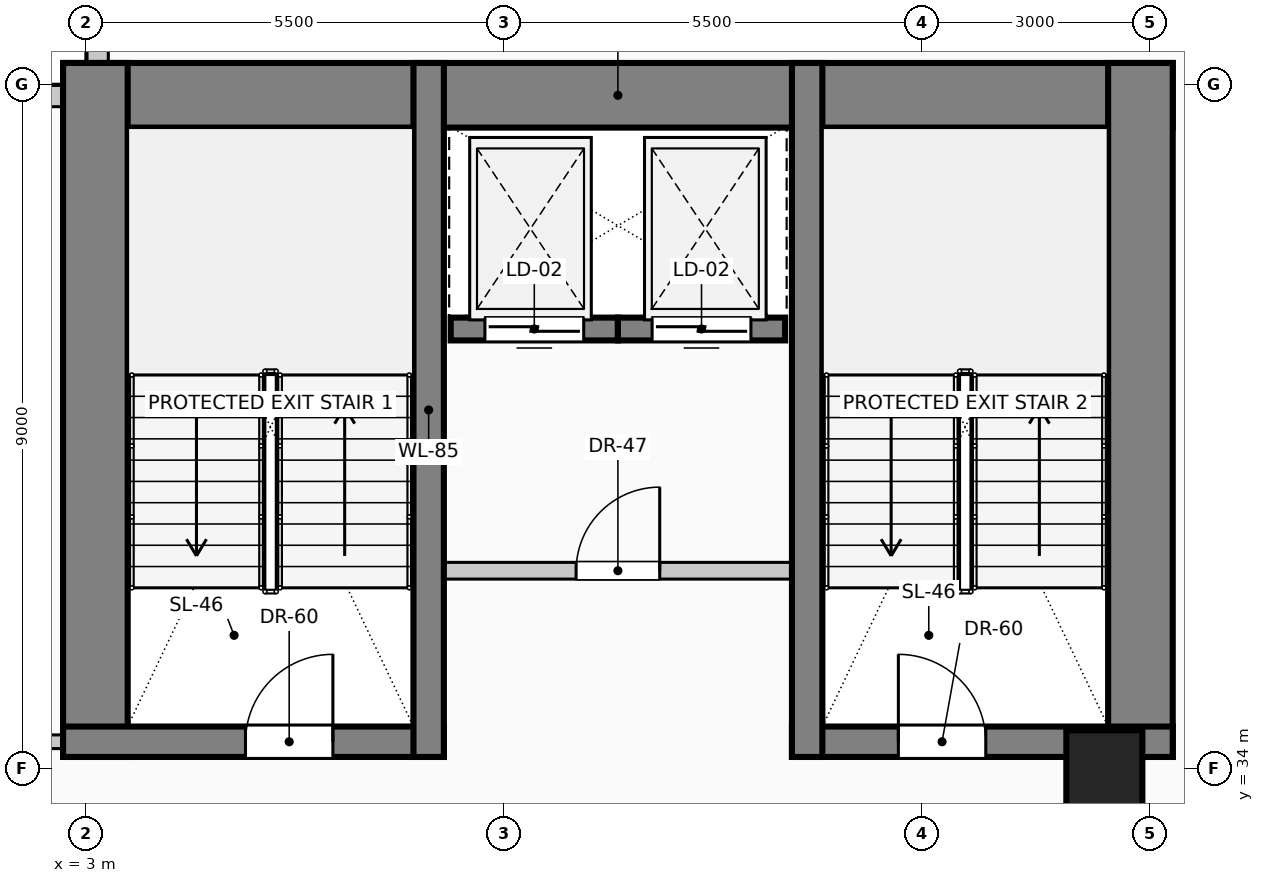
"""IFC4 building model, lengths in metres.
Left out: names, types, materials, properties, quantities, classifications, styles, units other than length and angle.
Written with IfcOpenShell. Run it as: python <this file> out.ifc"""

import sys

from ifc_helpers import new_model, si_unit, direction, frame, frame_2d, origin, origin_2d, place, context, subcontext, project, spatial, rectangle, circle, extrude, element, fill, save


model = new_model("IFC4")
c1 = context("Model", 3, precision=1e-05, world=origin(), true_north=direction((0.0, 1.0)))
c2 = subcontext(c1, "Body", "Model", "MODEL_VIEW")
j1 = project(units=[si_unit("LENGTHUNIT", "METRE"), si_unit("PLANEANGLEUNIT", "RADIAN")], contexts=[c1])
p1 = place(None, origin())
s1 = spatial("IfcSite", under=j1, at=p1, CompositionType="ELEMENT")
p2 = place(p1, origin())
s2 = spatial("IfcBuilding", under=s1, at=p2, CompositionType="ELEMENT")
p3 = place(p2, frame((0.0, 0.0, 104.6)))
s3 = spatial("IfcBuildingStorey", under=s2, at=p3, CompositionType="ELEMENT", Elevation=104.6)
p4 = place(p3, frame((2.7, 42.855, 0.0), z_axis=(0.0, 0.0, 1.0), x_axis=(1.0, 0.0, 0.0)))
e1 = element("IfcWall", 1, at=p4, inside=s3, PredefinedType="SHEAR", context=c2, shape_type="SweptSolid", body=[
    extrude(rectangle(XDim=14.6, YDim=0.85, at=frame_2d((7.3, 0.0))), origin(), (0.0, 0.0, 1.0), 4.0),
])
for number, where, z_axis, x_axis in (
    (2, (3.125, 34.15, 0.0), (0.0, 0.0, 1.0), (0.0, 1.0, 0.0)),
    (3, (16.875, 34.15, 0.0), (0.0, 0.0, 1.0), (0.0, 1.0, 0.0)),
):
    element("IfcWall", number, at=place(p3, frame(where, z_axis=z_axis, x_axis=x_axis)), inside=s3, PredefinedType="SHEAR", context=c2, shape_type="SweptSolid", body=[
        extrude(rectangle(XDim=9.13, YDim=0.85, at=frame_2d((4.565, 0.0))), origin(), (0.0, 0.0, 1.0), 4.0),
    ])
p5 = place(p3, frame((2.7, 34.35, 0.0), z_axis=(0.0, 0.0, 1.0), x_axis=(1.0, 0.0, 0.0)))
e4 = element("IfcWall", 4, at=p5, inside=s3, PredefinedType="SHEAR", context=c2, shape_type="SweptSolid", body=[
    extrude(rectangle(XDim=5.01, YDim=0.4, at=frame_2d((2.505, 0.0))), origin(), (0.0, 0.0, 1.0), 4.0),
])
p6 = place(p5, frame((2.4, 0.0, 0.0)))
e5 = element("IfcOpeningElement", 5, at=p6, cuts=e4, PredefinedType="OPENING", context=c2, shape_type="SweptSolid", body=[
    extrude(rectangle(XDim=1.15, YDim=2.2, at=frame_2d((0.575, 1.1))), frame((0.0, 0.21, 0.0), z_axis=(0.0, -1.0, 0.0), x_axis=(1.0, 0.0, 0.0)), (0.0, 0.0, 1.0), 0.42),
])
p7 = place(p3, frame((12.29, 34.35, 0.0), z_axis=(0.0, 0.0, 1.0), x_axis=(1.0, 0.0, 0.0)))
e6 = element("IfcWall", 6, at=p7, inside=s3, PredefinedType="SHEAR", context=c2, shape_type="SweptSolid", body=[
    extrude(rectangle(XDim=5.01, YDim=0.4, at=frame_2d((2.505, 0.0))), origin(), (0.0, 0.0, 1.0), 4.0),
])
p8 = place(p7, frame((1.4, 0.0, 0.0)))
e7 = element("IfcOpeningElement", 7, at=p8, cuts=e6, PredefinedType="OPENING", context=c2, shape_type="SweptSolid", body=[
    extrude(rectangle(XDim=1.15, YDim=2.2, at=frame_2d((0.575, 1.1))), frame((0.0, 0.21, 0.0), z_axis=(0.0, -1.0, 0.0), x_axis=(1.0, 0.0, 0.0)), (0.0, 0.0, 1.0), 0.42),
])
for number, where, z_axis, x_axis in (
    (8, (7.51, 34.15, 0.0), (0.0, 0.0, 1.0), (0.0, 1.0, 0.0)),
    (9, (12.49, 34.15, 0.0), (0.0, 0.0, 1.0), (0.0, 1.0, 0.0)),
):
    element("IfcWall", number, at=place(p3, frame(where, z_axis=z_axis, x_axis=x_axis)), inside=s3, PredefinedType="SHEAR", context=c2, shape_type="SweptSolid", body=[
        extrude(rectangle(XDim=9.13, YDim=0.4, at=frame_2d((4.565, 0.0))), origin(), (0.0, 0.0, 1.0), 4.0),
    ])
p9 = place(p3, frame((16.4, 34.0, 0.0), z_axis=(0.0, 0.0, 1.0), x_axis=(1.0, 0.0, 0.0)))
e10 = element("IfcColumn", 10, at=p9, inside=s3, PredefinedType="COLUMN", context=c2, shape_type="SweptSolid", body=[
    extrude(circle(Radius=0.5, at=origin_2d()), origin(), (0.0, 0.0, 1.0), 4.0),
])
p10 = place(p3, frame((0.6, 42.845, 0.0), z_axis=(0.0, 0.0, 1.0), x_axis=(1.0, 0.0, 0.0)))
e11 = element("IfcWall", 11, at=p10, inside=s3, PredefinedType="SOLIDWALL", context=c2, shape_type="SweptSolid", body=[
    extrude(rectangle(XDim=2.095, YDim=0.28, at=frame_2d((1.047, 0.0))), origin(), (0.0, 0.0, 1.0), 3.725),
])
p11 = place(p3, frame((3.155, 43.285, 0.0), z_axis=(0.0, 0.0, 1.0), x_axis=(0.0, 1.0, 0.0)))
e12 = element("IfcWall", 12, at=p11, inside=s3, PredefinedType="SOLIDWALL", context=c2, shape_type="SweptSolid", body=[
    extrude(rectangle(XDim=2.115, YDim=0.28, at=frame_2d((1.058, 0.0))), origin(), (0.0, 0.0, 1.0), 3.725),
])
p12 = place(p3, frame((10.0, 39.78, 0.0), z_axis=(0.0, 0.0, 1.0), x_axis=(-1.0, 0.0, 0.0)))
e13 = element("IfcWall", 13, at=p12, inside=s3, PredefinedType="SOLIDWALL", context=c2, shape_type="SweptSolid", body=[
    extrude(rectangle(XDim=2.2, YDim=0.3, at=frame_2d((1.1, 0.0))), origin(), (0.0, 0.0, 1.0), 4.0),
])
p13 = place(p12, frame((0.45, 0.0, 0.0)))
e14 = element("IfcOpeningElement", 14, at=p13, cuts=e13, PredefinedType="OPENING", context=c2, shape_type="SweptSolid", body=[
    extrude(rectangle(XDim=1.3, YDim=2.25, at=frame_2d((0.65, 1.125))), frame((0.0, 0.16, 0.0), z_axis=(0.0, -1.0, 0.0), x_axis=(1.0, 0.0, 0.0)), (0.0, 0.0, 1.0), 0.32),
])
p14 = place(p3, frame((12.2, 39.78, 0.0), z_axis=(0.0, 0.0, 1.0), x_axis=(-1.0, 0.0, 0.0)))
e15 = element("IfcWall", 15, at=p14, inside=s3, PredefinedType="SOLIDWALL", context=c2, shape_type="SweptSolid", body=[
    extrude(rectangle(XDim=2.2, YDim=0.3, at=frame_2d((1.1, 0.0))), origin(), (0.0, 0.0, 1.0), 4.0),
])
p15 = place(p14, frame((0.45, 0.0, 0.0)))
e16 = element("IfcOpeningElement", 16, at=p15, cuts=e15, PredefinedType="OPENING", context=c2, shape_type="SweptSolid", body=[
    extrude(rectangle(XDim=1.3, YDim=2.25, at=frame_2d((0.65, 1.125))), frame((0.0, 0.16, 0.0), z_axis=(0.0, -1.0, 0.0), x_axis=(1.0, 0.0, 0.0)), (0.0, 0.0, 1.0), 0.32),
])
p16 = place(p3, frame((7.51, 36.6, 0.0), z_axis=(0.0, 0.0, 1.0), x_axis=(1.0, 0.0, 0.0)))
e17 = element("IfcWall", 17, at=p16, inside=s3, PredefinedType="PARTITIONING", context=c2, shape_type="SweptSolid", body=[
    extrude(rectangle(XDim=4.98, YDim=0.22, at=frame_2d((2.49, 0.0))), origin(), (0.0, 0.0, 1.0), 3.725),
])
p17 = place(p16, frame((1.94, 0.0, 0.0)))
e18 = element("IfcOpeningElement", 18, at=p17, cuts=e17, PredefinedType="OPENING", context=c2, shape_type="SweptSolid", body=[
    extrude(rectangle(XDim=1.1, YDim=2.2, at=frame_2d((0.55, 1.1))), frame((0.0, 0.12, 0.0), z_axis=(0.0, -1.0, 0.0), x_axis=(1.0, 0.0, 0.0)), (0.0, 0.0, 1.0), 0.24),
])
p18 = place(p3, frame((1.175, 34.35, 0.0), z_axis=(0.0, 0.0, 1.0), x_axis=(1.0, 0.0, 0.0)))
e19 = element("IfcWall", 19, at=p18, inside=s3, PredefinedType="PARTITIONING", context=c2, shape_type="SweptSolid", body=[
    extrude(rectangle(XDim=1.525, YDim=0.18, at=frame_2d((0.762, 0.0))), origin(), (0.0, 0.0, 1.0), 3.725),
])
p19 = place(p13, origin())
e20 = element("IfcDoor", 20, at=p19, inside=s3, OperationType="SLIDING_TO_LEFT", PredefinedType="DOOR", context=c2, shape_type="SweptSolid", body=[
    extrude(rectangle(XDim=1.3, YDim=2.25, at=frame_2d((0.65, 1.125))), frame((0.0, 0.025, 0.0), z_axis=(0.0, -1.0, 0.0), x_axis=(1.0, 0.0, 0.0)), (0.0, 0.0, 1.0), 0.05),
])
fill(e14, e20)
p20 = place(p15, origin())
e21 = element("IfcDoor", 21, at=p20, inside=s3, OperationType="SLIDING_TO_RIGHT", PredefinedType="DOOR", context=c2, shape_type="SweptSolid", body=[
    extrude(rectangle(XDim=1.3, YDim=2.25, at=frame_2d((0.65, 1.125))), frame((0.0, 0.025, 0.0), z_axis=(0.0, -1.0, 0.0), x_axis=(1.0, 0.0, 0.0)), (0.0, 0.0, 1.0), 0.05),
])
fill(e16, e21)
p21 = place(p6, origin())
e22 = element("IfcDoor", 22, at=p21, inside=s3, OperationType="SINGLE_SWING_RIGHT", PredefinedType="DOOR", context=c2, shape_type="SweptSolid", body=[
    extrude(rectangle(XDim=1.15, YDim=2.2, at=frame_2d((0.575, 1.1))), frame((0.0, 0.025, 0.0), z_axis=(0.0, -1.0, 0.0), x_axis=(1.0, 0.0, 0.0)), (0.0, 0.0, 1.0), 0.05),
])
fill(e5, e22)
p22 = place(p8, origin())
e23 = element("IfcDoor", 23, at=p22, inside=s3, OperationType="SINGLE_SWING_LEFT", PredefinedType="DOOR", context=c2, shape_type="SweptSolid", body=[
    extrude(rectangle(XDim=1.15, YDim=2.2, at=frame_2d((0.575, 1.1))), frame((0.0, 0.025, 0.0), z_axis=(0.0, -1.0, 0.0), x_axis=(1.0, 0.0, 0.0)), (0.0, 0.0, 1.0), 0.05),
])
fill(e7, e23)
p23 = place(p17, origin())
e24 = element("IfcDoor", 24, at=p23, inside=s3, OperationType="SINGLE_SWING_RIGHT", PredefinedType="DOOR", context=c2, shape_type="SweptSolid", body=[
    extrude(rectangle(XDim=1.1, YDim=2.2, at=frame_2d((0.55, 1.1))), frame((0.0, 0.025, 0.0), z_axis=(0.0, -1.0, 0.0), x_axis=(1.0, 0.0, 0.0)), (0.0, 0.0, 1.0), 0.05),
])
fill(e18, e24)
save(model, sys.argv[1])
